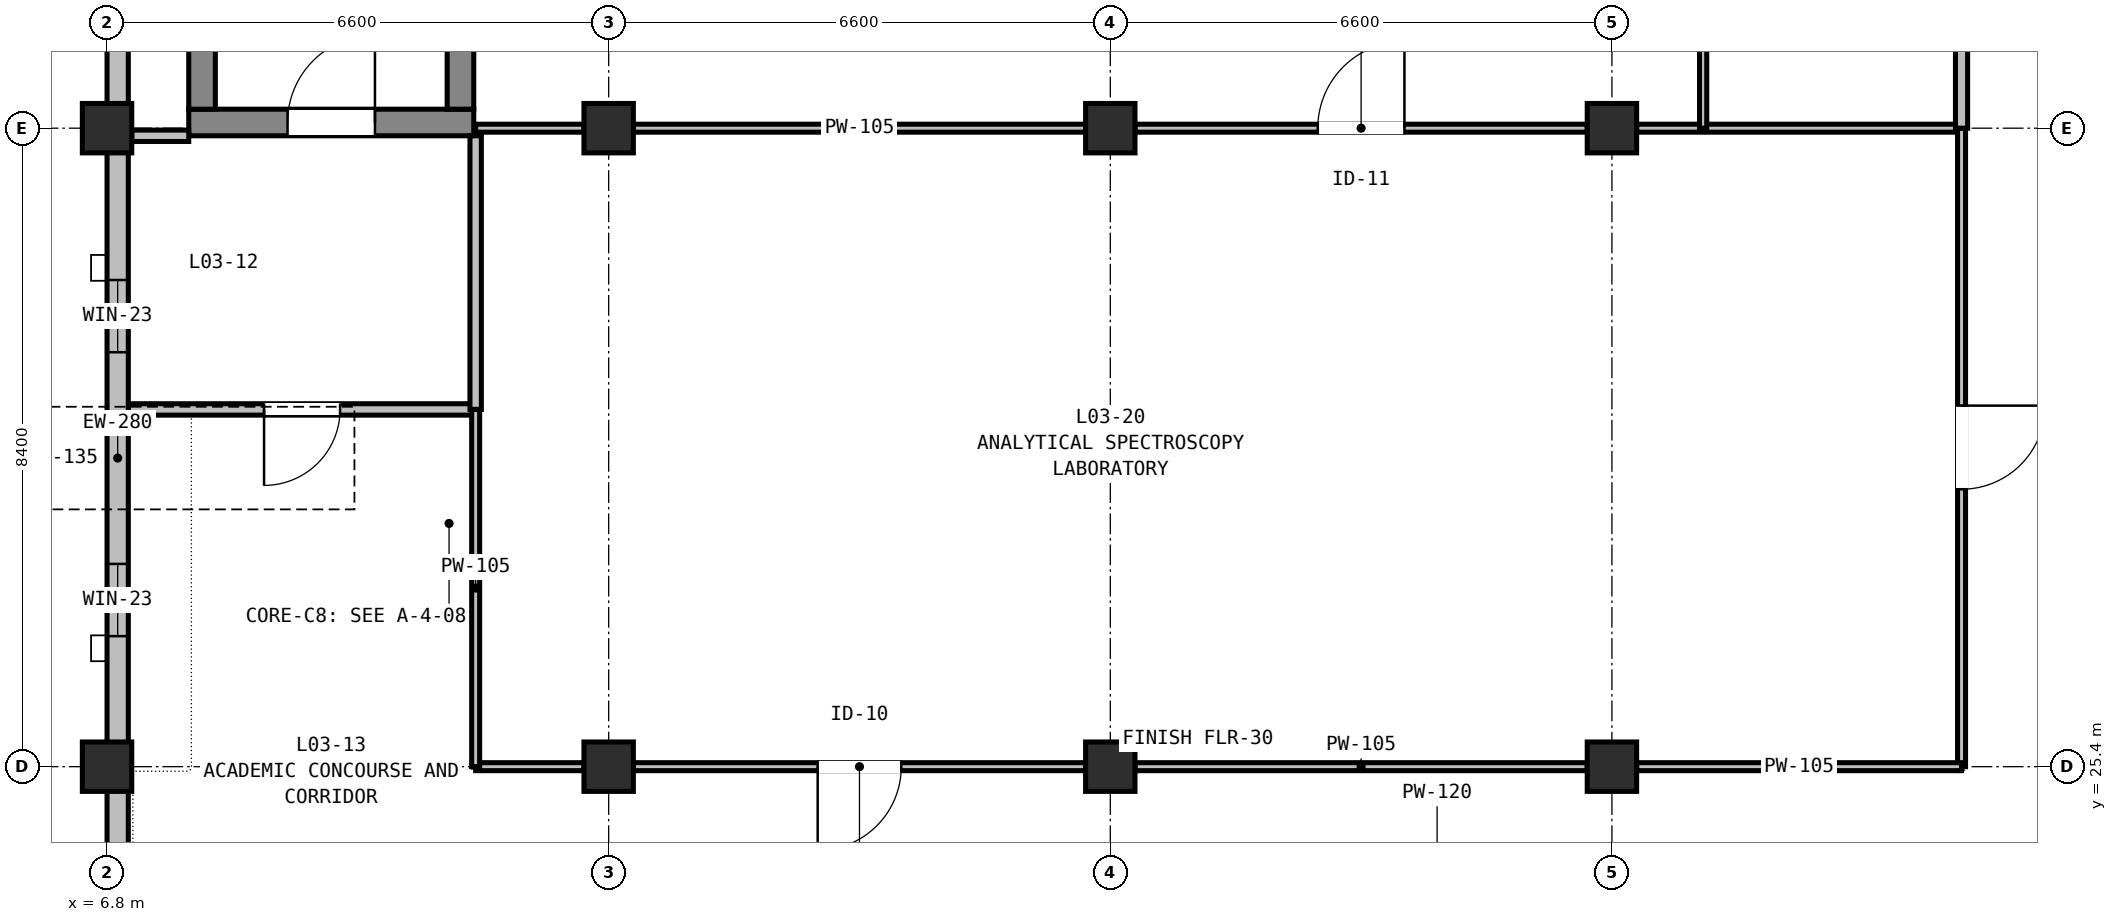
"""IFC4 building model, lengths in metres.
Left out: names, types, materials, properties, quantities, classifications, styles, units other than length and angle.
Written with IfcOpenShell. Run it as: python <this file> out.ifc"""

import sys

from ifc_helpers import new_model, si_unit, direction, frame, frame_2d, origin, origin_2d, place, context, subcontext, project, spatial, rectangle, extrude, element, fill, save


model = new_model("IFC4")
c1 = context("Model", 3, precision=1e-05, world=origin(), true_north=direction((0.0, 1.0)))
c2 = subcontext(c1, "Body", "Model", "MODEL_VIEW")
j1 = project(units=[si_unit("LENGTHUNIT", "METRE"), si_unit("PLANEANGLEUNIT", "RADIAN")], contexts=[c1])
p1 = place(None, origin())
s1 = spatial("IfcSite", under=j1, at=p1, CompositionType="ELEMENT")
p2 = place(p1, origin())
s2 = spatial("IfcBuilding", under=s1, at=p2, CompositionType="ELEMENT")
p3 = place(p2, frame((0.0, 0.0, 15.0)))
s3 = spatial("IfcBuildingStorey", under=s2, at=p3, CompositionType="ELEMENT", Elevation=15.0)
for number, where, z_axis, x_axis in (
    (1, (6.8, 25.4, 0.0), (0.0, 0.0, 1.0), (1.0, 0.0, 0.0)),
    (2, (6.8, 33.8, 0.0), (0.0, 0.0, 1.0), (1.0, 0.0, 0.0)),
    (3, (13.4, 25.4, 0.0), (0.0, 0.0, 1.0), (1.0, 0.0, 0.0)),
    (4, (13.4, 33.8, 0.0), (0.0, 0.0, 1.0), (1.0, 0.0, 0.0)),
    (5, (20.0, 25.4, 0.0), (0.0, 0.0, 1.0), (1.0, 0.0, 0.0)),
    (6, (20.0, 33.8, 0.0), (0.0, 0.0, 1.0), (1.0, 0.0, 0.0)),
    (7, (26.6, 25.4, 0.0), (0.0, 0.0, 1.0), (1.0, 0.0, 0.0)),
    (8, (26.6, 33.8, 0.0), (0.0, 0.0, 1.0), (1.0, 0.0, 0.0)),
):
    element("IfcColumn", number, at=place(p3, frame(where, z_axis=z_axis, x_axis=x_axis)), inside=s3, PredefinedType="COLUMN", context=c2, shape_type="SweptSolid", body=[
        extrude(rectangle(XDim=0.65, YDim=0.65, at=origin_2d()), origin(), (0.0, 0.0, 1.0), 4.5),
    ])
p4 = place(p3, frame((7.875, 33.875, 0.0), z_axis=(0.0, 0.0, 1.0), x_axis=(1.0, 0.0, 0.0)))
e9 = element("IfcWall", 9, at=p4, inside=s3, PredefinedType="SHEAR", context=c2, shape_type="SweptSolid", body=[
    extrude(rectangle(XDim=3.75, YDim=0.35, at=frame_2d((1.875, 0.0))), origin(), (0.0, 0.0, 1.0), 4.5),
])
p5 = place(p4, frame((1.3, 0.0, 0.0)))
e10 = element("IfcOpeningElement", 10, at=p5, cuts=e9, PredefinedType="OPENING", context=c2, shape_type="SweptSolid", body=[
    extrude(rectangle(XDim=1.15, YDim=2.15, at=frame_2d((0.575, 1.075))), frame((0.0, 0.185, 0.0), z_axis=(0.0, -1.0, 0.0), x_axis=(1.0, 0.0, 0.0)), (0.0, 0.0, 1.0), 0.37),
])
for number, where, z_axis, x_axis in (
    (11, (8.05, 34.05, 0.0), (0.0, 0.0, 1.0), (0.0, 1.0, 0.0)),
    (12, (11.45, 34.05, 0.0), (0.0, 0.0, 1.0), (0.0, 1.0, 0.0)),
):
    element("IfcWall", number, at=place(p3, frame(where, z_axis=z_axis, x_axis=x_axis)), inside=s3, PredefinedType="SHEAR", context=c2, shape_type="SweptSolid", body=[
        extrude(rectangle(XDim=7.275, YDim=0.35, at=frame_2d((3.637, 0.0))), origin(), (0.0, 0.0, 1.0), 4.5),
    ])
p6 = place(p3, frame((6.94, 17.0, 0.0), z_axis=(0.0, 0.0, 1.0), x_axis=(0.0, 1.0, 0.0)))
e13 = element("IfcWall", 13, at=p6, inside=s3, PredefinedType="STANDARD", context=c2, shape_type="SweptSolid", body=[
    extrude(rectangle(XDim=8.4, YDim=0.28, at=frame_2d((4.2, 0.0))), origin(), (0.0, 0.0, 1.0), 3.735),
])
p7 = place(p6, frame((1.193, 0.0, 0.75)))
e14 = element("IfcOpeningElement", 14, at=p7, cuts=e13, PredefinedType="OPENING", context=c2, shape_type="SweptSolid", body=[
    extrude(rectangle(XDim=2.15, YDim=2.4, at=frame_2d((1.075, 1.2))), frame((0.0, 0.15, 0.0), z_axis=(0.0, -1.0, 0.0), x_axis=(1.0, 0.0, 0.0)), (0.0, 0.0, 1.0), 0.3),
])
p8 = place(p3, frame((6.94, 25.4, 0.0), z_axis=(0.0, 0.0, 1.0), x_axis=(0.0, 1.0, 0.0)))
e15 = element("IfcWall", 15, at=p8, inside=s3, PredefinedType="STANDARD", context=c2, shape_type="SweptSolid", body=[
    extrude(rectangle(XDim=8.12, YDim=0.28, at=frame_2d((4.06, 0.0))), origin(), (0.0, 0.0, 1.0), 3.785),
])
p9 = place(p8, frame((1.717, 0.0, 0.9)))
e16 = element("IfcOpeningElement", 16, at=p9, cuts=e15, PredefinedType="OPENING", context=c2, shape_type="SweptSolid", body=[
    extrude(rectangle(XDim=0.95, YDim=1.8, at=frame_2d((0.475, 0.9))), frame((0.0, 0.15, 0.0), z_axis=(0.0, -1.0, 0.0), x_axis=(1.0, 0.0, 0.0)), (0.0, 0.0, 1.0), 0.3),
])
p10 = place(p8, frame((5.453, 0.0, 0.9)))
e17 = element("IfcOpeningElement", 17, at=p10, cuts=e15, PredefinedType="OPENING", context=c2, shape_type="SweptSolid", body=[
    extrude(rectangle(XDim=0.95, YDim=1.8, at=frame_2d((0.475, 0.9))), frame((0.0, 0.15, 0.0), z_axis=(0.0, -1.0, 0.0), x_axis=(1.0, 0.0, 0.0)), (0.0, 0.0, 1.0), 0.3),
])
p11 = place(p3, frame((6.94, 34.08, 0.0), z_axis=(0.0, 0.0, 1.0), x_axis=(0.0, 1.0, 0.0)))
e18 = element("IfcWall", 18, at=p11, inside=s3, PredefinedType="STANDARD", context=c2, shape_type="SweptSolid", body=[
    extrude(rectangle(XDim=7.84, YDim=0.28, at=frame_2d((3.92, 0.0))), origin(), (0.0, 0.0, 1.0), 3.785),
])
p12 = place(p11, frame((0.792, 0.0, 0.9)))
e19 = element("IfcOpeningElement", 19, at=p12, cuts=e18, PredefinedType="OPENING", context=c2, shape_type="SweptSolid", body=[
    extrude(rectangle(XDim=2.65, YDim=1.85, at=frame_2d((1.325, 0.925))), frame((0.0, 0.15, 0.0), z_axis=(0.0, -1.0, 0.0), x_axis=(1.0, 0.0, 0.0)), (0.0, 0.0, 1.0), 0.3),
])
p13 = place(p11, frame((4.398, 0.0, 0.9)))
e20 = element("IfcOpeningElement", 20, at=p13, cuts=e18, PredefinedType="OPENING", context=c2, shape_type="SweptSolid", body=[
    extrude(rectangle(XDim=2.65, YDim=1.85, at=frame_2d((1.325, 0.925))), frame((0.0, 0.15, 0.0), z_axis=(0.0, -1.0, 0.0), x_axis=(1.0, 0.0, 0.0)), (0.0, 0.0, 1.0), 0.3),
])
p14 = place(p3, frame((11.65, 30.1, 0.0), z_axis=(0.0, 0.0, 1.0), x_axis=(-1.0, 0.0, 0.0)))
e21 = element("IfcWall", 21, at=p14, inside=s3, PredefinedType="PARTITIONING", context=c2, shape_type="SweptSolid", body=[
    extrude(rectangle(XDim=4.568, YDim=0.15, at=frame_2d((2.284, 0.0))), origin(), (0.0, 0.0, 1.0), 3.785),
])
p15 = place(p14, frame((1.784, 0.0, 0.0)))
e22 = element("IfcOpeningElement", 22, at=p15, cuts=e21, PredefinedType="OPENING", context=c2, shape_type="SweptSolid", body=[
    extrude(rectangle(XDim=1.0, YDim=2.1, at=frame_2d((0.5, 1.05))), frame((0.0, 0.085, 0.0), z_axis=(0.0, -1.0, 0.0), x_axis=(1.0, 0.0, 0.0)), (0.0, 0.0, 1.0), 0.17),
])
p16 = place(p3, frame((7.125, 33.7, 0.0), z_axis=(0.0, 0.0, 1.0), x_axis=(1.0, 0.0, 0.0)))
e23 = element("IfcWall", 23, at=p16, inside=s3, PredefinedType="PARTITIONING", context=c2, shape_type="SweptSolid", body=[
    extrude(rectangle(XDim=0.75, YDim=0.15, at=frame_2d((0.375, 0.0))), origin(), (0.0, 0.0, 1.0), 3.835),
])
p17 = place(p3, frame((11.65, 33.7, 0.0), z_axis=(0.0, 0.0, 1.0), x_axis=(0.0, -1.0, 0.0)))
e24 = element("IfcWall", 24, at=p17, inside=s3, PredefinedType="PARTITIONING", context=c2, shape_type="SweptSolid", body=[
    extrude(rectangle(XDim=3.6, YDim=0.15, at=frame_2d((1.8, 0.0))), origin(), (0.0, 0.0, 1.0), 3.835),
])
p18 = place(p3, frame((11.65, 33.8, 0.0), z_axis=(0.0, 0.0, 1.0), x_axis=(1.0, 0.0, 0.0)))
e25 = element("IfcWall", 25, at=p18, inside=s3, PredefinedType="PARTITIONING", context=c2, shape_type="SweptSolid", body=[
    extrude(rectangle(XDim=1.425, YDim=0.105, at=frame_2d((0.712, 0.0))), origin(), (0.0, 0.0, 1.0), 3.835),
])
p19 = place(p3, frame((13.725, 33.8, 0.0), z_axis=(0.0, 0.0, 1.0), x_axis=(1.0, 0.0, 0.0)))
e26 = element("IfcWall", 26, at=p19, inside=s3, PredefinedType="PARTITIONING", context=c2, shape_type="SweptSolid", body=[
    extrude(rectangle(XDim=5.95, YDim=0.105, at=frame_2d((2.975, 0.0))), origin(), (0.0, 0.0, 1.0), 3.835),
])
p20 = place(p3, frame((20.325, 33.8, 0.0), z_axis=(0.0, 0.0, 1.0), x_axis=(1.0, 0.0, 0.0)))
e27 = element("IfcWall", 27, at=p20, inside=s3, PredefinedType="PARTITIONING", context=c2, shape_type="SweptSolid", body=[
    extrude(rectangle(XDim=5.95, YDim=0.105, at=frame_2d((2.975, 0.0))), origin(), (0.0, 0.0, 1.0), 3.835),
])
p21 = place(p20, frame((2.405, 0.0, 0.0)))
e28 = element("IfcOpeningElement", 28, at=p21, cuts=e27, PredefinedType="OPENING", context=c2, shape_type="SweptSolid", body=[
    extrude(rectangle(XDim=1.14, YDim=2.06, at=frame_2d((0.57, 1.03))), frame((0.0, 0.062, 0.0), z_axis=(0.0, -1.0, 0.0), x_axis=(1.0, 0.0, 0.0)), (0.0, 0.0, 1.0), 0.125),
])
p22 = place(p3, frame((26.925, 33.8, 0.0), z_axis=(0.0, 0.0, 1.0), x_axis=(1.0, 0.0, 0.0)))
e29 = element("IfcWall", 29, at=p22, inside=s3, PredefinedType="PARTITIONING", context=c2, shape_type="SweptSolid", body=[
    extrude(rectangle(XDim=4.275, YDim=0.105, at=frame_2d((2.137, 0.0))), origin(), (0.0, 0.0, 1.0), 3.835),
])
p23 = place(p3, frame((31.2, 33.8, 0.0), z_axis=(0.0, 0.0, 1.0), x_axis=(0.0, -1.0, 0.0)))
e30 = element("IfcWall", 30, at=p23, inside=s3, PredefinedType="PARTITIONING", context=c2, shape_type="SweptSolid", body=[
    extrude(rectangle(XDim=8.4, YDim=0.105, at=frame_2d((4.2, 0.0))), origin(), (0.0, 0.0, 1.0), 3.835),
])
p24 = place(p23, frame((3.65, 0.0, 0.0)))
e31 = element("IfcOpeningElement", 31, at=p24, cuts=e30, PredefinedType="OPENING", context=c2, shape_type="SweptSolid", body=[
    extrude(rectangle(XDim=1.1, YDim=2.06, at=frame_2d((0.55, 1.03))), frame((0.0, 0.062, 0.0), z_axis=(0.0, -1.0, 0.0), x_axis=(1.0, 0.0, 0.0)), (0.0, 0.0, 1.0), 0.125),
])
p25 = place(p3, frame((31.2, 25.4, 0.0), z_axis=(0.0, 0.0, 1.0), x_axis=(-1.0, 0.0, 0.0)))
e32 = element("IfcWall", 32, at=p25, inside=s3, PredefinedType="PARTITIONING", context=c2, shape_type="SweptSolid", body=[
    extrude(rectangle(XDim=4.275, YDim=0.105, at=frame_2d((2.137, 0.0))), origin(), (0.0, 0.0, 1.0), 3.835),
])
p26 = place(p3, frame((26.275, 25.4, 0.0), z_axis=(0.0, 0.0, 1.0), x_axis=(-1.0, 0.0, 0.0)))
e33 = element("IfcWall", 33, at=p26, inside=s3, PredefinedType="PARTITIONING", context=c2, shape_type="SweptSolid", body=[
    extrude(rectangle(XDim=5.95, YDim=0.105, at=frame_2d((2.975, 0.0))), origin(), (0.0, 0.0, 1.0), 3.835),
])
p27 = place(p3, frame((19.675, 25.4, 0.0), z_axis=(0.0, 0.0, 1.0), x_axis=(-1.0, 0.0, 0.0)))
e34 = element("IfcWall", 34, at=p27, inside=s3, PredefinedType="PARTITIONING", context=c2, shape_type="SweptSolid", body=[
    extrude(rectangle(XDim=5.95, YDim=0.105, at=frame_2d((2.975, 0.0))), origin(), (0.0, 0.0, 1.0), 3.835),
])
p28 = place(p27, frame((2.425, 0.0, 0.0)))
e35 = element("IfcOpeningElement", 35, at=p28, cuts=e34, PredefinedType="OPENING", context=c2, shape_type="SweptSolid", body=[
    extrude(rectangle(XDim=1.1, YDim=2.06, at=frame_2d((0.55, 1.03))), frame((0.0, 0.062, 0.0), z_axis=(0.0, -1.0, 0.0), x_axis=(1.0, 0.0, 0.0)), (0.0, 0.0, 1.0), 0.125),
])
p29 = place(p3, frame((13.075, 25.4, 0.0), z_axis=(0.0, 0.0, 1.0), x_axis=(-1.0, 0.0, 0.0)))
e36 = element("IfcWall", 36, at=p29, inside=s3, PredefinedType="PARTITIONING", context=c2, shape_type="SweptSolid", body=[
    extrude(rectangle(XDim=1.425, YDim=0.105, at=frame_2d((0.712, 0.0))), origin(), (0.0, 0.0, 1.0), 3.835),
])
p30 = place(p3, frame((11.65, 25.4, 0.0), z_axis=(0.0, 0.0, 1.0), x_axis=(0.0, 1.0, 0.0)))
e37 = element("IfcWall", 37, at=p30, inside=s3, PredefinedType="PARTITIONING", context=c2, shape_type="SweptSolid", body=[
    extrude(rectangle(XDim=4.7, YDim=0.105, at=frame_2d((2.35, 0.0))), origin(), (0.0, 0.0, 1.0), 3.835),
])
p31 = place(p3, frame((27.8, 42.04, 0.0), z_axis=(0.0, 0.0, 1.0), x_axis=(0.0, -1.0, 0.0)))
e38 = element("IfcWall", 38, at=p31, inside=s3, PredefinedType="PARTITIONING", context=c2, shape_type="SweptSolid", body=[
    extrude(rectangle(XDim=8.24, YDim=0.095, at=frame_2d((4.12, 0.0))), origin(), (0.0, 0.0, 1.0), 3.785),
])
p32 = place(p31, frame((3.55, 0.0, 0.0)))
e39 = element("IfcOpeningElement", 39, at=p32, cuts=e38, PredefinedType="OPENING", context=c2, shape_type="SweptSolid", body=[
    extrude(rectangle(XDim=1.14, YDim=2.06, at=frame_2d((0.57, 1.03))), frame((0.0, 0.057, 0.0), z_axis=(0.0, -1.0, 0.0), x_axis=(1.0, 0.0, 0.0)), (0.0, 0.0, 1.0), 0.115),
])
p33 = place(p3, frame((31.2, 42.04, 0.0), z_axis=(0.0, 0.0, 1.0), x_axis=(0.0, -1.0, 0.0)))
e40 = element("IfcWall", 40, at=p33, inside=s3, PredefinedType="PARTITIONING", context=c2, shape_type="SweptSolid", body=[
    extrude(rectangle(XDim=8.24, YDim=0.16, at=frame_2d((4.12, 0.0))), origin(), (0.0, 0.0, 1.0), 3.785),
])
p34 = place(p33, frame((3.44, 0.0, 0.0)))
e41 = element("IfcOpeningElement", 41, at=p34, cuts=e40, PredefinedType="OPENING", context=c2, shape_type="SweptSolid", body=[
    extrude(rectangle(XDim=1.36, YDim=2.14, at=frame_2d((0.68, 1.07))), frame((0.0, 0.09, 0.0), z_axis=(0.0, -1.0, 0.0), x_axis=(1.0, 0.0, 0.0)), (0.0, 0.0, 1.0), 0.18),
])
p35 = place(p9, origin())
e42 = element("IfcWindow", 42, at=p35, inside=s3, PartitioningType="SINGLE_PANEL", PredefinedType="WINDOW", context=c2, shape_type="SweptSolid", body=[
    extrude(rectangle(XDim=0.95, YDim=1.8, at=frame_2d((0.475, 0.9))), frame((0.0, 0.03, 0.0), z_axis=(0.0, -1.0, 0.0), x_axis=(1.0, 0.0, 0.0)), (0.0, 0.0, 1.0), 0.06),
])
fill(e16, e42)
p36 = place(p10, origin())
e43 = element("IfcWindow", 43, at=p36, inside=s3, PartitioningType="SINGLE_PANEL", PredefinedType="WINDOW", context=c2, shape_type="SweptSolid", body=[
    extrude(rectangle(XDim=0.95, YDim=1.8, at=frame_2d((0.475, 0.9))), frame((0.0, 0.03, 0.0), z_axis=(0.0, -1.0, 0.0), x_axis=(1.0, 0.0, 0.0)), (0.0, 0.0, 1.0), 0.06),
])
fill(e17, e43)
p37 = place(p5, origin())
e44 = element("IfcDoor", 44, at=p37, inside=s3, OperationType="SINGLE_SWING_RIGHT", PredefinedType="DOOR", context=c2, shape_type="SweptSolid", body=[
    extrude(rectangle(XDim=1.15, YDim=2.15, at=frame_2d((0.575, 1.075))), frame((0.0, 0.025, 0.0), z_axis=(0.0, -1.0, 0.0), x_axis=(1.0, 0.0, 0.0)), (0.0, 0.0, 1.0), 0.05),
])
fill(e10, e44)
p38 = place(p15, origin())
e45 = element("IfcDoor", 45, at=p38, inside=s3, OperationType="SINGLE_SWING_RIGHT", PredefinedType="DOOR", context=c2, shape_type="SweptSolid", body=[
    extrude(rectangle(XDim=1.0, YDim=2.1, at=frame_2d((0.5, 1.05))), frame((0.0, 0.025, 0.0), z_axis=(0.0, -1.0, 0.0), x_axis=(1.0, 0.0, 0.0)), (0.0, 0.0, 1.0), 0.05),
])
fill(e22, e45)
p39 = place(p24, origin())
e46 = element("IfcDoor", 46, at=p39, inside=s3, OperationType="SINGLE_SWING_LEFT", PredefinedType="DOOR", context=c2, shape_type="SweptSolid", body=[
    extrude(rectangle(XDim=1.1, YDim=2.06, at=frame_2d((0.55, 1.03))), frame((0.0, 0.025, 0.0), z_axis=(0.0, -1.0, 0.0), x_axis=(1.0, 0.0, 0.0)), (0.0, 0.0, 1.0), 0.05),
])
fill(e31, e46)
p40 = place(p28, origin())
e47 = element("IfcDoor", 47, at=p40, inside=s3, OperationType="SINGLE_SWING_RIGHT", PredefinedType="DOOR", context=c2, shape_type="SweptSolid", body=[
    extrude(rectangle(XDim=1.1, YDim=2.06, at=frame_2d((0.55, 1.03))), frame((0.0, 0.025, 0.0), z_axis=(0.0, -1.0, 0.0), x_axis=(1.0, 0.0, 0.0)), (0.0, 0.0, 1.0), 0.05),
])
fill(e35, e47)
p41 = place(p21, origin())
e48 = element("IfcDoor", 48, at=p41, inside=s3, OperationType="SINGLE_SWING_RIGHT", PredefinedType="DOOR", context=c2, shape_type="SweptSolid", body=[
    extrude(rectangle(XDim=1.14, YDim=2.06, at=frame_2d((0.57, 1.03))), frame((0.0, 0.025, 0.0), z_axis=(0.0, -1.0, 0.0), x_axis=(1.0, 0.0, 0.0)), (0.0, 0.0, 1.0), 0.05),
])
fill(e28, e48)
save(model, sys.argv[1])
